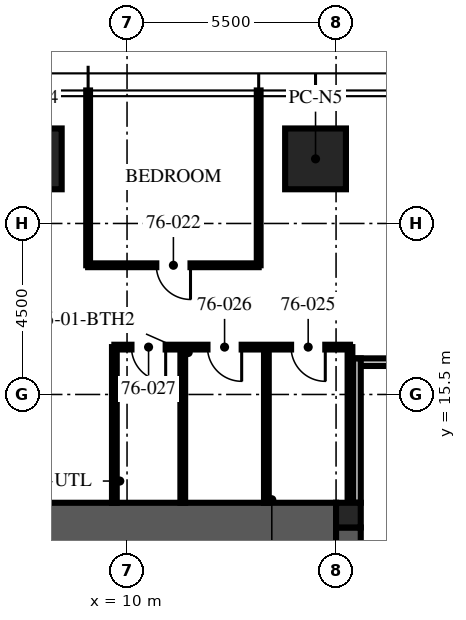
"""IFC4 building model, lengths in metres.
Left out: names, types, materials, properties, quantities, classifications, styles, units other than length and angle.
Written with IfcOpenShell. Run it as: python <this file> out.ifc"""

import sys

from ifc_helpers import new_model, si_unit, direction, frame, frame_2d, origin, origin_2d, place, context, subcontext, project, spatial, rectangle, extrude, element, fill, save


model = new_model("IFC4")
c1 = context("Model", 3, precision=1e-05, world=origin(), true_north=direction((0.0, 1.0)))
c2 = subcontext(c1, "Body", "Model", "MODEL_VIEW")
j1 = project(units=[si_unit("LENGTHUNIT", "METRE"), si_unit("PLANEANGLEUNIT", "RADIAN")], contexts=[c1])
p1 = place(None, origin())
s1 = spatial("IfcSite", under=j1, at=p1, CompositionType="ELEMENT")
p2 = place(p1, origin())
s2 = spatial("IfcBuilding", under=s1, at=p2, CompositionType="ELEMENT")
p3 = place(p2, frame((0.0, 0.0, 304.5)))
s3 = spatial("IfcBuildingStorey", under=s2, at=p3, CompositionType="ELEMENT", Elevation=304.5)
p4 = place(p3, frame((15.5, -12.0, -0.25), z_axis=(0.0, 0.0, 1.0), x_axis=(0.0, 1.0, 0.0)))
e1 = element("IfcWall", 1, at=p4, inside=s3, PredefinedType="SHEAR", context=c2, shape_type="SweptSolid", body=[
    extrude(rectangle(XDim=24.0, YDim=1.3, at=frame_2d((12.0, 0.0))), origin(), (0.0, 0.0, 1.0), 3.75),
])
p5 = place(p4, frame((3.125, 0.0, 0.25)))
e2 = element("IfcOpeningElement", 2, at=p5, cuts=e1, PredefinedType="OPENING", context=c2, shape_type="SweptSolid", body=[
    extrude(rectangle(XDim=1.2, YDim=2.1, at=frame_2d((0.6, 1.05))), frame((0.0, 0.66, 0.0), z_axis=(0.0, -1.0, 0.0), x_axis=(1.0, 0.0, 0.0)), (0.0, 0.0, 1.0), 1.32),
])
p6 = place(p4, frame((19.375, 0.0, 0.25)))
e3 = element("IfcOpeningElement", 3, at=p6, cuts=e1, PredefinedType="OPENING", context=c2, shape_type="SweptSolid", body=[
    extrude(rectangle(XDim=1.8, YDim=2.1, at=frame_2d((0.9, 1.05))), frame((0.0, 0.66, 0.0), z_axis=(0.0, -1.0, 0.0), x_axis=(1.0, 0.0, 0.0)), (0.0, 0.0, 1.0), 1.32),
])
p7 = place(p3, frame((-15.5, 12.0, -0.25), z_axis=(0.0, 0.0, 1.0), x_axis=(1.0, 0.0, 0.0)))
e4 = element("IfcWall", 4, at=p7, inside=s3, PredefinedType="SHEAR", context=c2, shape_type="SweptSolid", body=[
    extrude(rectangle(XDim=31.0, YDim=1.3, at=frame_2d((15.5, 0.0))), origin(), (0.0, 0.0, 1.0), 3.75),
])
p8 = place(p3, frame((15.825, 12.325, -0.25), z_axis=(0.0, 0.0, 1.0), x_axis=(1.0, 0.0, 0.0)))
e5 = element("IfcColumn", 5, at=p8, inside=s3, PredefinedType="COLUMN", context=c2, shape_type="SweptSolid", body=[
    extrude(rectangle(XDim=0.65, YDim=0.65, at=origin_2d()), origin(), (0.0, 0.0, 1.0), 3.75),
])
for number, where, z_axis, x_axis in (
    (6, (7.48, 21.7, 0.0), (0.0, 0.0, 1.0), (1.0, 0.0, 0.0)),
    (7, (14.96, 21.7, 0.0), (0.0, 0.0, 1.0), (1.0, 0.0, 0.0)),
):
    element("IfcColumn", number, at=place(p3, frame(where, z_axis=z_axis, x_axis=x_axis)), inside=s3, PredefinedType="COLUMN", context=c2, shape_type="SweptSolid", body=[
        extrude(rectangle(XDim=1.6, YDim=1.6, at=origin_2d()), origin(), (0.0, 0.0, 1.0), 3.75),
    ])
p9 = place(p3, frame((19.15, 16.35, 0.0), z_axis=(0.0, 0.0, 1.0), x_axis=(-1.0, 0.0, 0.0)))
e8 = element("IfcWall", 8, at=p9, inside=s3, PredefinedType="PARTITIONING", context=c2, shape_type="SweptSolid", body=[
    extrude(rectangle(XDim=3.2, YDim=0.2, at=frame_2d((1.6, 0.0))), origin(), (0.0, 0.0, 1.0), 2.6),
])
p10 = place(p3, frame((16.05, 16.45, 0.0), z_axis=(0.0, 0.0, 1.0), x_axis=(0.0, -1.0, 0.0)))
e9 = element("IfcWall", 9, at=p10, inside=s3, PredefinedType="PARTITIONING", context=c2, shape_type="SweptSolid", body=[
    extrude(rectangle(XDim=3.8, YDim=0.2, at=frame_2d((1.9, 0.0))), origin(), (0.0, 0.0, 1.0), 2.6),
])
for number, where, z_axis, x_axis in (
    (10, (13.464, 18.9, 0.0), (0.0, 0.0, 1.0), (0.0, 1.0, 0.0)),
    (11, (8.976, 18.9, 0.0), (0.0, 0.0, 1.0), (0.0, 1.0, 0.0)),
):
    element("IfcWall", number, at=place(p3, frame(where, z_axis=z_axis, x_axis=x_axis)), inside=s3, PredefinedType="PARTITIONING", context=c2, shape_type="SweptSolid", body=[
        extrude(rectangle(XDim=4.6, YDim=0.1, at=frame_2d((2.3, 0.0))), origin(), (0.0, 0.0, 1.0), 3.01),
    ])
p11 = place(p3, frame((13.464, 18.9, 0.0), z_axis=(0.0, 0.0, 1.0), x_axis=(-1.0, 0.0, 0.0)))
e12 = element("IfcWall", 12, at=p11, inside=s3, PredefinedType="PARTITIONING", context=c2, shape_type="SweptSolid", body=[
    extrude(rectangle(XDim=4.488, YDim=0.1, at=frame_2d((2.244, 0.0))), origin(), (0.0, 0.0, 1.0), 2.91),
])
p12 = place(p11, frame((1.794, 0.0, 0.0)))
e13 = element("IfcOpeningElement", 13, at=p12, cuts=e12, PredefinedType="OPENING", context=c2, shape_type="SweptSolid", body=[
    extrude(rectangle(XDim=0.9, YDim=2.1, at=frame_2d((0.45, 1.05))), frame((0.0, 0.06, 0.0), z_axis=(0.0, -1.0, 0.0), x_axis=(1.0, 0.0, 0.0)), (0.0, 0.0, 1.0), 0.12),
])
p13 = place(p3, frame((15.866, 16.746, 0.0), z_axis=(0.0, 0.0, 1.0), x_axis=(-1.0, 0.0, 0.0)))
e14 = element("IfcWall", 14, at=p13, inside=s3, PredefinedType="PARTITIONING", context=c2, shape_type="SweptSolid", body=[
    extrude(rectangle(XDim=6.2, YDim=0.125, at=frame_2d((3.1, 0.0))), origin(), (0.0, 0.0, 1.0), 2.9),
])
p14 = place(p13, frame((0.65, 0.0, 0.0)))
e15 = element("IfcOpeningElement", 15, at=p14, cuts=e14, PredefinedType="OPENING", context=c2, shape_type="SweptSolid", body=[
    extrude(rectangle(XDim=0.9, YDim=2.1, at=frame_2d((0.45, 1.05))), frame((0.0, 0.073, 0.0), z_axis=(0.0, -1.0, 0.0), x_axis=(1.0, 0.0, 0.0)), (0.0, 0.0, 1.0), 0.145),
])
p15 = place(p13, frame((2.85, 0.0, 0.0)))
e16 = element("IfcOpeningElement", 16, at=p15, cuts=e14, PredefinedType="OPENING", context=c2, shape_type="SweptSolid", body=[
    extrude(rectangle(XDim=0.9, YDim=2.1, at=frame_2d((0.45, 1.05))), frame((0.0, 0.073, 0.0), z_axis=(0.0, -1.0, 0.0), x_axis=(1.0, 0.0, 0.0)), (0.0, 0.0, 1.0), 0.145),
])
p16 = place(p13, frame((4.85, 0.0, 0.0)))
e17 = element("IfcOpeningElement", 17, at=p16, cuts=e14, PredefinedType="OPENING", context=c2, shape_type="SweptSolid", body=[
    extrude(rectangle(XDim=0.9, YDim=2.1, at=frame_2d((0.45, 1.05))), frame((0.0, 0.073, 0.0), z_axis=(0.0, -1.0, 0.0), x_axis=(1.0, 0.0, 0.0)), (0.0, 0.0, 1.0), 0.145),
])
p17 = place(p3, frame((15.866, 12.65, 0.0), z_axis=(0.0, 0.0, 1.0), x_axis=(0.0, 1.0, 0.0)))
e18 = element("IfcWall", 18, at=p17, inside=s3, PredefinedType="PARTITIONING", context=c2, shape_type="SweptSolid", body=[
    extrude(rectangle(XDim=4.096, YDim=0.125, at=frame_2d((2.048, 0.0))), origin(), (0.0, 0.0, 1.0), 2.6),
])
for number, where, z_axis, x_axis in (
    (19, (13.667, 12.65, 0.0), (0.0, 0.0, 1.0), (0.0, 1.0, 0.0)),
    (20, (11.467, 12.65, 0.0), (0.0, 0.0, 1.0), (0.0, 1.0, 0.0)),
    (21, (9.667, 12.65, 0.0), (0.0, 0.0, 1.0), (0.0, 1.0, 0.0)),
):
    element("IfcWall", number, at=place(p3, frame(where, z_axis=z_axis, x_axis=x_axis)), inside=s3, PredefinedType="PARTITIONING", context=c2, shape_type="SweptSolid", body=[
        extrude(rectangle(XDim=4.096, YDim=0.125, at=frame_2d((2.048, 0.0))), origin(), (0.0, 0.0, 1.0), 3.5),
    ])
p18 = place(p12, origin())
e22 = element("IfcDoor", 22, at=p18, inside=s3, OperationType="SINGLE_SWING_LEFT", PredefinedType="DOOR", context=c2, shape_type="SweptSolid", body=[
    extrude(rectangle(XDim=0.9, YDim=2.1, at=frame_2d((0.45, 1.05))), frame((0.0, 0.025, 0.0), z_axis=(0.0, -1.0, 0.0), x_axis=(1.0, 0.0, 0.0)), (0.0, 0.0, 1.0), 0.05),
])
fill(e13, e22)
p19 = place(p14, origin())
e23 = element("IfcDoor", 23, at=p19, inside=s3, OperationType="SINGLE_SWING_LEFT", PredefinedType="DOOR", context=c2, shape_type="SweptSolid", body=[
    extrude(rectangle(XDim=0.9, YDim=2.1, at=frame_2d((0.45, 1.05))), frame((0.0, 0.025, 0.0), z_axis=(0.0, -1.0, 0.0), x_axis=(1.0, 0.0, 0.0)), (0.0, 0.0, 1.0), 0.05),
])
fill(e15, e23)
p20 = place(p15, origin())
e24 = element("IfcDoor", 24, at=p20, inside=s3, OperationType="SINGLE_SWING_LEFT", PredefinedType="DOOR", context=c2, shape_type="SweptSolid", body=[
    extrude(rectangle(XDim=0.9, YDim=2.1, at=frame_2d((0.45, 1.05))), frame((0.0, 0.025, 0.0), z_axis=(0.0, -1.0, 0.0), x_axis=(1.0, 0.0, 0.0)), (0.0, 0.0, 1.0), 0.05),
])
fill(e16, e24)
p21 = place(p16, origin())
e25 = element("IfcDoor", 25, at=p21, inside=s3, OperationType="SINGLE_SWING_LEFT", PredefinedType="DOOR", context=c2, shape_type="SweptSolid", body=[
    extrude(rectangle(XDim=0.9, YDim=2.1, at=frame_2d((0.45, 1.05))), frame((0.0, 0.025, 0.0), z_axis=(0.0, -1.0, 0.0), x_axis=(1.0, 0.0, 0.0)), (0.0, 0.0, 1.0), 0.05),
])
fill(e17, e25)
save(model, sys.argv[1])
